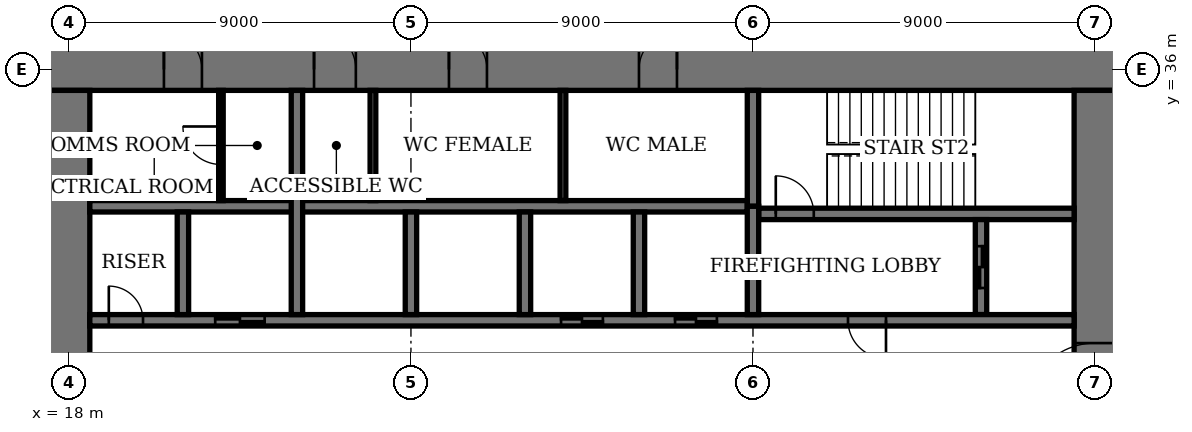
"""IFC4 building model, lengths in metres.
Left out: names, types, materials, properties, quantities, classifications, styles, units other than length and angle.
Written with IfcOpenShell. Run it as: python <this file> out.ifc"""

import sys

from ifc_helpers import new_model, si_unit, direction, frame, frame_2d, origin, place, context, subcontext, project, spatial, rectangle, extrude, element, fill, save


model = new_model("IFC4")
c1 = context("Model", 3, precision=1e-05, world=origin(), true_north=direction((0.0, 1.0)))
c2 = subcontext(c1, "Body", "Model", "MODEL_VIEW")
j1 = project(units=[si_unit("LENGTHUNIT", "METRE"), si_unit("PLANEANGLEUNIT", "RADIAN")], contexts=[c1])
p1 = place(None, origin())
s1 = spatial("IfcSite", under=j1, at=p1, CompositionType="ELEMENT")
p2 = place(p1, origin())
s2 = spatial("IfcBuilding", under=s1, at=p2, CompositionType="ELEMENT")
p3 = place(p2, frame((0.0, 0.0, 109.0)))
s3 = spatial("IfcBuildingStorey", under=s2, at=p3, CompositionType="ELEMENT", Elevation=109.0)
p4 = place(p3, frame((45.55, 36.0, 0.0), z_axis=(0.0, 0.0, 1.0), x_axis=(-1.0, 0.0, 0.0)))
e1 = element("IfcWall", 1, at=p4, inside=s3, PredefinedType="SHEAR", context=c2, shape_type="SweptSolid", body=[
    extrude(rectangle(XDim=28.1, YDim=1.1, at=frame_2d((14.05, 0.0))), origin(), (0.0, 0.0, 1.0), 4.0),
])
p5 = place(p4, frame((11.55, 0.0, 0.0)))
e2 = element("IfcOpeningElement", 2, at=p5, cuts=e1, PredefinedType="OPENING", context=c2, shape_type="SweptSolid", body=[
    extrude(rectangle(XDim=1.0, YDim=2.4, at=frame_2d((0.5, 1.2))), frame((0.0, 0.56, 0.0), z_axis=(0.0, -1.0, 0.0), x_axis=(1.0, 0.0, 0.0)), (0.0, 0.0, 1.0), 1.12),
])
p6 = place(p4, frame((16.55, 0.0, 0.0)))
e3 = element("IfcOpeningElement", 3, at=p6, cuts=e1, PredefinedType="OPENING", context=c2, shape_type="SweptSolid", body=[
    extrude(rectangle(XDim=1.0, YDim=2.4, at=frame_2d((0.5, 1.2))), frame((0.0, 0.56, 0.0), z_axis=(0.0, -1.0, 0.0), x_axis=(1.0, 0.0, 0.0)), (0.0, 0.0, 1.0), 1.12),
])
p7 = place(p4, frame((20.0, 0.0, 0.0)))
e4 = element("IfcOpeningElement", 4, at=p7, cuts=e1, PredefinedType="OPENING", context=c2, shape_type="SweptSolid", body=[
    extrude(rectangle(XDim=1.1, YDim=2.4, at=frame_2d((0.55, 1.2))), frame((0.0, 0.56, 0.0), z_axis=(0.0, -1.0, 0.0), x_axis=(1.0, 0.0, 0.0)), (0.0, 0.0, 1.0), 1.12),
])
p8 = place(p4, frame((24.05, 0.0, 0.0)))
e5 = element("IfcOpeningElement", 5, at=p8, cuts=e1, PredefinedType="OPENING", context=c2, shape_type="SweptSolid", body=[
    extrude(rectangle(XDim=1.0, YDim=2.4, at=frame_2d((0.5, 1.2))), frame((0.0, 0.56, 0.0), z_axis=(0.0, -1.0, 0.0), x_axis=(1.0, 0.0, 0.0)), (0.0, 0.0, 1.0), 1.12),
])
p9 = place(p3, frame((18.0, 35.45, 0.0), z_axis=(0.0, 0.0, 1.0), x_axis=(0.0, -1.0, 0.0)))
e6 = element("IfcWall", 6, at=p9, inside=s3, PredefinedType="SHEAR", context=c2, shape_type="SweptSolid", body=[
    extrude(rectangle(XDim=16.9, YDim=1.1, at=frame_2d((8.45, 0.0))), origin(), (0.0, 0.0, 1.0), 4.0),
])
p10 = place(p9, frame((8.45, 0.0, 0.0)))
e7 = element("IfcOpeningElement", 7, at=p10, cuts=e6, PredefinedType="OPENING", context=c2, shape_type="SweptSolid", body=[
    extrude(rectangle(XDim=1.8, YDim=2.4, at=frame_2d((0.9, 1.2))), frame((0.0, 0.56, 0.0), z_axis=(0.0, -1.0, 0.0), x_axis=(1.0, 0.0, 0.0)), (0.0, 0.0, 1.0), 1.12),
])
p11 = place(p3, frame((45.0, 18.55, 0.0), z_axis=(0.0, 0.0, 1.0), x_axis=(0.0, 1.0, 0.0)))
e8 = element("IfcWall", 8, at=p11, inside=s3, PredefinedType="SHEAR", context=c2, shape_type="SweptSolid", body=[
    extrude(rectangle(XDim=16.9, YDim=1.1, at=frame_2d((8.45, 0.0))), origin(), (0.0, 0.0, 1.0), 4.0),
])
p12 = place(p11, frame((8.45, 0.0, 0.0)))
e9 = element("IfcOpeningElement", 9, at=p12, cuts=e8, PredefinedType="OPENING", context=c2, shape_type="SweptSolid", body=[
    extrude(rectangle(XDim=1.8, YDim=2.4, at=frame_2d((0.9, 1.2))), frame((0.0, 0.56, 0.0), z_axis=(0.0, -1.0, 0.0), x_axis=(1.0, 0.0, 0.0)), (0.0, 0.0, 1.0), 1.12),
])
p13 = place(p3, frame((36.15, 32.2, 0.0), z_axis=(0.0, 0.0, 1.0), x_axis=(1.0, 0.0, 0.0)))
e10 = element("IfcWall", 10, at=p13, inside=s3, PredefinedType="SHEAR", context=c2, shape_type="SweptSolid", body=[
    extrude(rectangle(XDim=8.3, YDim=0.3, at=frame_2d((4.15, 0.0))), origin(), (0.0, 0.0, 1.0), 4.0),
])
p14 = place(p13, frame((0.45, 0.0, 0.0)))
e11 = element("IfcOpeningElement", 11, at=p14, cuts=e10, PredefinedType="OPENING", context=c2, shape_type="SweptSolid", body=[
    extrude(rectangle(XDim=1.0, YDim=2.4, at=frame_2d((0.5, 1.2))), frame((0.0, 0.16, 0.0), z_axis=(0.0, -1.0, 0.0), x_axis=(1.0, 0.0, 0.0)), (0.0, 0.0, 1.0), 0.32),
])
p15 = place(p3, frame((36.0, 32.4, 0.0), z_axis=(0.0, 0.0, 1.0), x_axis=(0.0, 1.0, 0.0)))
e12 = element("IfcWall", 12, at=p15, inside=s3, PredefinedType="SHEAR", context=c2, shape_type="SweptSolid", body=[
    extrude(rectangle(XDim=3.05, YDim=0.3, at=frame_2d((1.525, 0.0))), origin(), (0.0, 0.0, 1.0), 4.0),
])
p16 = place(p3, frame((42.0, 29.55, 0.0), z_axis=(0.0, 0.0, 1.0), x_axis=(0.0, 1.0, 0.0)))
e13 = element("IfcWall", 13, at=p16, inside=s3, PredefinedType="SHEAR", context=c2, shape_type="SweptSolid", body=[
    extrude(rectangle(XDim=2.5, YDim=0.3, at=frame_2d((1.25, 0.0))), origin(), (0.0, 0.0, 1.0), 4.0),
])
p17 = place(p16, frame((0.7, 0.0, 0.0)))
e14 = element("IfcOpeningElement", 14, at=p17, cuts=e13, PredefinedType="OPENING", context=c2, shape_type="SweptSolid", body=[
    extrude(rectangle(XDim=1.1, YDim=2.4, at=frame_2d((0.55, 1.2))), frame((0.0, 0.16, 0.0), z_axis=(0.0, -1.0, 0.0), x_axis=(1.0, 0.0, 0.0)), (0.0, 0.0, 1.0), 0.32),
])
p18 = place(p3, frame((18.55, 29.4, 0.0), z_axis=(0.0, 0.0, 1.0), x_axis=(1.0, 0.0, 0.0)))
e15 = element("IfcWall", 15, at=p18, inside=s3, PredefinedType="SHEAR", context=c2, shape_type="SweptSolid", body=[
    extrude(rectangle(XDim=25.9, YDim=0.3, at=frame_2d((12.95, 0.0))), origin(), (0.0, 0.0, 1.0), 4.0),
])
p19 = place(p18, frame((19.95, 0.0, 0.0)))
e16 = element("IfcOpeningElement", 16, at=p19, cuts=e15, PredefinedType="OPENING", context=c2, shape_type="SweptSolid", body=[
    extrude(rectangle(XDim=1.0, YDim=2.4, at=frame_2d((0.5, 1.2))), frame((0.0, 0.16, 0.0), z_axis=(0.0, -1.0, 0.0), x_axis=(1.0, 0.0, 0.0)), (0.0, 0.0, 1.0), 0.32),
])
p20 = place(p18, frame((0.5, 0.0, 0.0)))
e17 = element("IfcOpeningElement", 17, at=p20, cuts=e15, PredefinedType="OPENING", context=c2, shape_type="SweptSolid", body=[
    extrude(rectangle(XDim=0.9, YDim=2.1, at=frame_2d((0.45, 1.05))), frame((0.0, 0.16, 0.0), z_axis=(0.0, -1.0, 0.0), x_axis=(1.0, 0.0, 0.0)), (0.0, 0.0, 1.0), 0.32),
])
p21 = place(p18, frame((15.4, 0.0, 0.0)))
e18 = element("IfcOpeningElement", 18, at=p21, cuts=e15, PredefinedType="OPENING", context=c2, shape_type="SweptSolid", body=[
    extrude(rectangle(XDim=1.1, YDim=2.4, at=frame_2d((0.55, 1.2))), frame((0.0, 0.16, 0.0), z_axis=(0.0, -1.0, 0.0), x_axis=(1.0, 0.0, 0.0)), (0.0, 0.0, 1.0), 0.32),
])
p22 = place(p18, frame((12.4, 0.0, 0.0)))
e19 = element("IfcOpeningElement", 19, at=p22, cuts=e15, PredefinedType="OPENING", context=c2, shape_type="SweptSolid", body=[
    extrude(rectangle(XDim=1.1, YDim=2.4, at=frame_2d((0.55, 1.2))), frame((0.0, 0.16, 0.0), z_axis=(0.0, -1.0, 0.0), x_axis=(1.0, 0.0, 0.0)), (0.0, 0.0, 1.0), 0.32),
])
p23 = place(p18, frame((3.3, 0.0, 0.0)))
e20 = element("IfcOpeningElement", 20, at=p23, cuts=e15, PredefinedType="OPENING", context=c2, shape_type="SweptSolid", body=[
    extrude(rectangle(XDim=1.3, YDim=2.4, at=frame_2d((0.65, 1.2))), frame((0.0, 0.16, 0.0), z_axis=(0.0, -1.0, 0.0), x_axis=(1.0, 0.0, 0.0)), (0.0, 0.0, 1.0), 0.32),
])
p24 = place(p3, frame((18.55, 32.4, 0.0), z_axis=(0.0, 0.0, 1.0), x_axis=(1.0, 0.0, 0.0)))
e21 = element("IfcWall", 21, at=p24, inside=s3, PredefinedType="SHEAR", context=c2, shape_type="SweptSolid", body=[
    extrude(rectangle(XDim=17.3, YDim=0.3, at=frame_2d((8.65, 0.0))), origin(), (0.0, 0.0, 1.0), 4.0),
])
for number, where, z_axis, x_axis in (
    (22, (33.0, 29.55, 0.0), (0.0, 0.0, 1.0), (0.0, 1.0, 0.0)),
    (23, (30.0, 29.55, 0.0), (0.0, 0.0, 1.0), (0.0, 1.0, 0.0)),
    (24, (27.0, 29.55, 0.0), (0.0, 0.0, 1.0), (0.0, 1.0, 0.0)),
):
    element("IfcWall", number, at=place(p3, frame(where, z_axis=z_axis, x_axis=x_axis)), inside=s3, PredefinedType="SHEAR", context=c2, shape_type="SweptSolid", body=[
        extrude(rectangle(XDim=2.7, YDim=0.3, at=frame_2d((1.35, 0.0))), origin(), (0.0, 0.0, 1.0), 4.0),
    ])
p25 = place(p3, frame((24.0, 29.55, 0.0), z_axis=(0.0, 0.0, 1.0), x_axis=(0.0, 1.0, 0.0)))
e25 = element("IfcWall", 25, at=p25, inside=s3, PredefinedType="SHEAR", context=c2, shape_type="SweptSolid", body=[
    extrude(rectangle(XDim=5.9, YDim=0.3, at=frame_2d((2.95, 0.0))), origin(), (0.0, 0.0, 1.0), 4.0),
])
p26 = place(p3, frame((21.0, 29.55, 0.0), z_axis=(0.0, 0.0, 1.0), x_axis=(0.0, 1.0, 0.0)))
e26 = element("IfcWall", 26, at=p26, inside=s3, PredefinedType="SHEAR", context=c2, shape_type="SweptSolid", body=[
    extrude(rectangle(XDim=2.7, YDim=0.3, at=frame_2d((1.35, 0.0))), origin(), (0.0, 0.0, 1.0), 4.0),
])
p27 = place(p3, frame((36.0, 29.55, 0.0), z_axis=(0.0, 0.0, 1.0), x_axis=(0.0, 1.0, 0.0)))
e27 = element("IfcWall", 27, at=p27, inside=s3, PredefinedType="SHEAR", context=c2, shape_type="SweptSolid", body=[
    extrude(rectangle(XDim=2.85, YDim=0.3, at=frame_2d((1.425, 0.0))), origin(), (0.0, 0.0, 1.0), 4.0),
])
for number, where, z_axis, x_axis in (
    (28, (31.0, 32.55, 0.0), (0.0, 0.0, 1.0), (0.0, 1.0, 0.0)),
    (29, (26.0, 32.55, 0.0), (0.0, 0.0, 1.0), (0.0, 1.0, 0.0)),
):
    element("IfcWall", number, at=place(p3, frame(where, z_axis=z_axis, x_axis=x_axis)), inside=s3, PredefinedType="PARTITIONING", context=c2, shape_type="SweptSolid", body=[
        extrude(rectangle(XDim=2.9, YDim=0.15, at=frame_2d((1.45, 0.0))), origin(), (0.0, 0.0, 1.0), 3.75),
    ])
p28 = place(p3, frame((22.0, 32.55, 0.0), z_axis=(0.0, 0.0, 1.0), x_axis=(0.0, 1.0, 0.0)))
e30 = element("IfcWall", 30, at=p28, inside=s3, PredefinedType="PARTITIONING", context=c2, shape_type="SweptSolid", body=[
    extrude(rectangle(XDim=2.9, YDim=0.12, at=frame_2d((1.45, 0.0))), origin(), (0.0, 0.0, 1.0), 3.75),
])
p29 = place(p28, frame((0.95, 0.0, 0.0)))
e31 = element("IfcOpeningElement", 31, at=p29, cuts=e30, PredefinedType="OPENING", context=c2, shape_type="SweptSolid", body=[
    extrude(rectangle(XDim=1.0, YDim=2.4, at=frame_2d((0.5, 1.2))), frame((0.0, 0.07, 0.0), z_axis=(0.0, -1.0, 0.0), x_axis=(1.0, 0.0, 0.0)), (0.0, 0.0, 1.0), 0.14),
])
p30 = place(p12, origin())
e32 = element("IfcDoor", 32, at=p30, inside=s3, OperationType="DOUBLE_DOOR_DOUBLE_SWING", PredefinedType="DOOR", context=c2, shape_type="SweptSolid", body=[
    extrude(rectangle(XDim=1.8, YDim=2.4, at=frame_2d((0.9, 1.2))), frame((0.0, 0.03, 0.0), z_axis=(0.0, -1.0, 0.0), x_axis=(1.0, 0.0, 0.0)), (0.0, 0.0, 1.0), 0.06),
    extrude(rectangle(XDim=0.04, YDim=2.4, at=frame_2d((0.02, 1.2))), frame((0.0, 0.55, 0.0), z_axis=(0.0, -1.0, 0.0), x_axis=(1.0, 0.0, 0.0)), (0.0, 0.0, 1.0), 1.1),
    extrude(rectangle(XDim=0.04, YDim=2.4, at=frame_2d((1.78, 1.2))), frame((0.0, 0.55, 0.0), z_axis=(0.0, -1.0, 0.0), x_axis=(1.0, 0.0, 0.0)), (0.0, 0.0, 1.0), 1.1),
    extrude(rectangle(XDim=1.8, YDim=0.04, at=frame_2d((0.9, 2.38))), frame((0.0, 0.55, 0.0), z_axis=(0.0, -1.0, 0.0), x_axis=(1.0, 0.0, 0.0)), (0.0, 0.0, 1.0), 1.1),
])
fill(e9, e32)
p31 = place(p5, origin())
e33 = element("IfcDoor", 33, at=p31, inside=s3, OperationType="SINGLE_SWING_LEFT", PredefinedType="DOOR", context=c2, shape_type="SweptSolid", body=[
    extrude(rectangle(XDim=1.0, YDim=2.4, at=frame_2d((0.5, 1.2))), frame((0.0, 0.025, 0.0), z_axis=(0.0, -1.0, 0.0), x_axis=(1.0, 0.0, 0.0)), (0.0, 0.0, 1.0), 0.05),
    extrude(rectangle(XDim=0.04, YDim=2.4, at=frame_2d((0.02, 1.2))), frame((0.0, 0.4, 0.0), z_axis=(0.0, -1.0, 0.0), x_axis=(1.0, 0.0, 0.0)), (0.0, 0.0, 1.0), 0.8),
    extrude(rectangle(XDim=0.04, YDim=2.4, at=frame_2d((0.98, 1.2))), frame((0.0, 0.4, 0.0), z_axis=(0.0, -1.0, 0.0), x_axis=(1.0, 0.0, 0.0)), (0.0, 0.0, 1.0), 0.8),
    extrude(rectangle(XDim=1.0, YDim=0.04, at=frame_2d((0.5, 2.38))), frame((0.0, 0.4, 0.0), z_axis=(0.0, -1.0, 0.0), x_axis=(1.0, 0.0, 0.0)), (0.0, 0.0, 1.0), 0.8),
])
fill(e2, e33)
p32 = place(p6, origin())
e34 = element("IfcDoor", 34, at=p32, inside=s3, OperationType="SINGLE_SWING_RIGHT", PredefinedType="DOOR", context=c2, shape_type="SweptSolid", body=[
    extrude(rectangle(XDim=1.0, YDim=2.4, at=frame_2d((0.5, 1.2))), frame((0.0, 0.025, 0.0), z_axis=(0.0, -1.0, 0.0), x_axis=(1.0, 0.0, 0.0)), (0.0, 0.0, 1.0), 0.05),
    extrude(rectangle(XDim=0.04, YDim=2.4, at=frame_2d((0.02, 1.2))), frame((0.0, 0.4, 0.0), z_axis=(0.0, -1.0, 0.0), x_axis=(1.0, 0.0, 0.0)), (0.0, 0.0, 1.0), 0.8),
    extrude(rectangle(XDim=0.04, YDim=2.4, at=frame_2d((0.98, 1.2))), frame((0.0, 0.4, 0.0), z_axis=(0.0, -1.0, 0.0), x_axis=(1.0, 0.0, 0.0)), (0.0, 0.0, 1.0), 0.8),
    extrude(rectangle(XDim=1.0, YDim=0.04, at=frame_2d((0.5, 2.38))), frame((0.0, 0.4, 0.0), z_axis=(0.0, -1.0, 0.0), x_axis=(1.0, 0.0, 0.0)), (0.0, 0.0, 1.0), 0.8),
])
fill(e3, e34)
p33 = place(p7, origin())
e35 = element("IfcDoor", 35, at=p33, inside=s3, OperationType="SINGLE_SWING_RIGHT", PredefinedType="DOOR", context=c2, shape_type="SweptSolid", body=[
    extrude(rectangle(XDim=1.1, YDim=2.4, at=frame_2d((0.55, 1.2))), frame((0.0, 0.025, 0.0), z_axis=(0.0, -1.0, 0.0), x_axis=(1.0, 0.0, 0.0)), (0.0, 0.0, 1.0), 0.05),
    extrude(rectangle(XDim=0.04, YDim=2.4, at=frame_2d((0.02, 1.2))), frame((0.0, 0.44, 0.0), z_axis=(0.0, -1.0, 0.0), x_axis=(1.0, 0.0, 0.0)), (0.0, 0.0, 1.0), 0.88),
    extrude(rectangle(XDim=0.04, YDim=2.4, at=frame_2d((1.08, 1.2))), frame((0.0, 0.44, 0.0), z_axis=(0.0, -1.0, 0.0), x_axis=(1.0, 0.0, 0.0)), (0.0, 0.0, 1.0), 0.88),
    extrude(rectangle(XDim=1.1, YDim=0.04, at=frame_2d((0.55, 2.38))), frame((0.0, 0.44, 0.0), z_axis=(0.0, -1.0, 0.0), x_axis=(1.0, 0.0, 0.0)), (0.0, 0.0, 1.0), 0.88),
])
fill(e4, e35)
p34 = place(p8, origin())
e36 = element("IfcDoor", 36, at=p34, inside=s3, OperationType="SINGLE_SWING_RIGHT", PredefinedType="DOOR", context=c2, shape_type="SweptSolid", body=[
    extrude(rectangle(XDim=1.0, YDim=2.4, at=frame_2d((0.5, 1.2))), frame((0.0, 0.025, 0.0), z_axis=(0.0, -1.0, 0.0), x_axis=(1.0, 0.0, 0.0)), (0.0, 0.0, 1.0), 0.05),
    extrude(rectangle(XDim=0.04, YDim=2.4, at=frame_2d((0.02, 1.2))), frame((0.0, 0.4, 0.0), z_axis=(0.0, -1.0, 0.0), x_axis=(1.0, 0.0, 0.0)), (0.0, 0.0, 1.0), 0.8),
    extrude(rectangle(XDim=0.04, YDim=2.4, at=frame_2d((0.98, 1.2))), frame((0.0, 0.4, 0.0), z_axis=(0.0, -1.0, 0.0), x_axis=(1.0, 0.0, 0.0)), (0.0, 0.0, 1.0), 0.8),
    extrude(rectangle(XDim=1.0, YDim=0.04, at=frame_2d((0.5, 2.38))), frame((0.0, 0.4, 0.0), z_axis=(0.0, -1.0, 0.0), x_axis=(1.0, 0.0, 0.0)), (0.0, 0.0, 1.0), 0.8),
])
fill(e5, e36)
p35 = place(p14, origin())
e37 = element("IfcDoor", 37, at=p35, inside=s3, OperationType="SINGLE_SWING_RIGHT", PredefinedType="DOOR", context=c2, shape_type="SweptSolid", body=[
    extrude(rectangle(XDim=1.0, YDim=2.4, at=frame_2d((0.5, 1.2))), frame((0.0, 0.03, 0.0), z_axis=(0.0, -1.0, 0.0), x_axis=(1.0, 0.0, 0.0)), (0.0, 0.0, 1.0), 0.06),
])
fill(e11, e37)
p36 = place(p19, origin())
e38 = element("IfcDoor", 38, at=p36, inside=s3, OperationType="SINGLE_SWING_RIGHT", PredefinedType="DOOR", context=c2, shape_type="SweptSolid", body=[
    extrude(rectangle(XDim=1.0, YDim=2.4, at=frame_2d((0.5, 1.2))), frame((0.0, 0.03, 0.0), z_axis=(0.0, -1.0, 0.0), x_axis=(1.0, 0.0, 0.0)), (0.0, 0.0, 1.0), 0.06),
])
fill(e16, e38)
p37 = place(p20, origin())
e39 = element("IfcDoor", 39, at=p37, inside=s3, OperationType="SINGLE_SWING_RIGHT", PredefinedType="DOOR", context=c2, shape_type="SweptSolid", body=[
    extrude(rectangle(XDim=0.9, YDim=2.1, at=frame_2d((0.45, 1.05))), frame((0.0, 0.03, 0.0), z_axis=(0.0, -1.0, 0.0), x_axis=(1.0, 0.0, 0.0)), (0.0, 0.0, 1.0), 0.06),
])
fill(e17, e39)
p38 = place(p29, origin())
e40 = element("IfcDoor", 40, at=p38, inside=s3, OperationType="SINGLE_SWING_LEFT", PredefinedType="DOOR", context=c2, shape_type="SweptSolid", body=[
    extrude(rectangle(XDim=1.0, YDim=2.4, at=frame_2d((0.5, 1.2))), frame((0.0, 0.03, 0.0), z_axis=(0.0, -1.0, 0.0), x_axis=(1.0, 0.0, 0.0)), (0.0, 0.0, 1.0), 0.06),
])
fill(e31, e40)
p39 = place(p21, origin())
e41 = element("IfcDoor", 41, at=p39, inside=s3, OperationType="DOUBLE_DOOR_SLIDING", PredefinedType="DOOR", context=c2, shape_type="SweptSolid", body=[
    extrude(rectangle(XDim=1.1, YDim=2.4, at=frame_2d((0.55, 1.2))), frame((0.0, 0.02, 0.0), z_axis=(0.0, -1.0, 0.0), x_axis=(1.0, 0.0, 0.0)), (0.0, 0.0, 1.0), 0.04),
])
fill(e18, e41)
p40 = place(p22, origin())
e42 = element("IfcDoor", 42, at=p40, inside=s3, OperationType="DOUBLE_DOOR_SLIDING", PredefinedType="DOOR", context=c2, shape_type="SweptSolid", body=[
    extrude(rectangle(XDim=1.1, YDim=2.4, at=frame_2d((0.55, 1.2))), frame((0.0, 0.02, 0.0), z_axis=(0.0, -1.0, 0.0), x_axis=(1.0, 0.0, 0.0)), (0.0, 0.0, 1.0), 0.04),
])
fill(e19, e42)
p41 = place(p23, origin())
e43 = element("IfcDoor", 43, at=p41, inside=s3, OperationType="DOUBLE_DOOR_SLIDING", PredefinedType="DOOR", context=c2, shape_type="SweptSolid", body=[
    extrude(rectangle(XDim=1.3, YDim=2.4, at=frame_2d((0.65, 1.2))), frame((0.0, 0.02, 0.0), z_axis=(0.0, -1.0, 0.0), x_axis=(1.0, 0.0, 0.0)), (0.0, 0.0, 1.0), 0.04),
])
fill(e20, e43)
p42 = place(p17, origin())
e44 = element("IfcDoor", 44, at=p42, inside=s3, OperationType="DOUBLE_DOOR_SLIDING", PredefinedType="DOOR", context=c2, shape_type="SweptSolid", body=[
    extrude(rectangle(XDim=1.1, YDim=2.4, at=frame_2d((0.55, 1.2))), frame((0.0, 0.03, 0.0), z_axis=(0.0, -1.0, 0.0), x_axis=(1.0, 0.0, 0.0)), (0.0, 0.0, 1.0), 0.06),
])
fill(e14, e44)
save(model, sys.argv[1])
